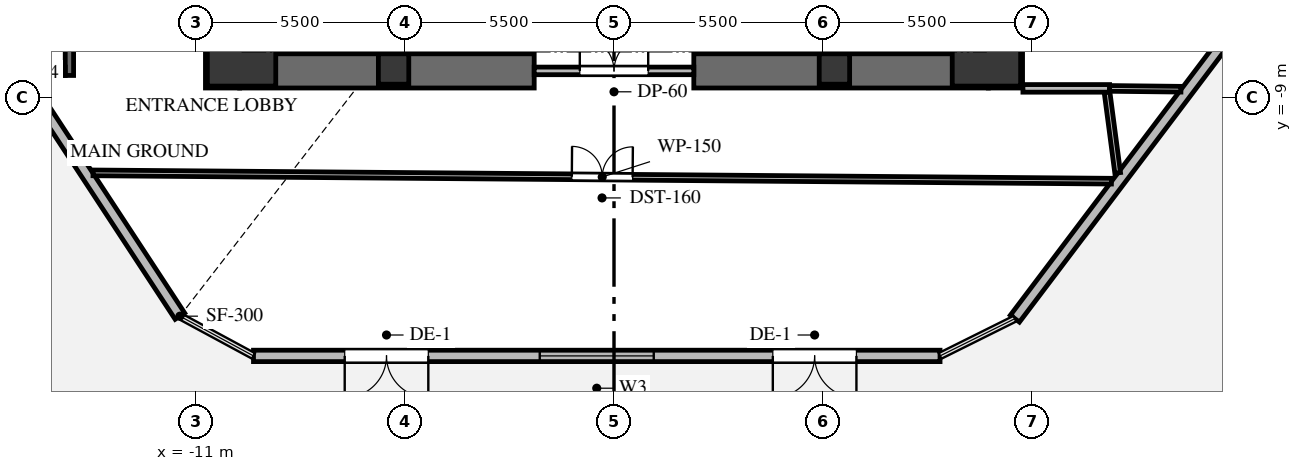
"""IFC4 building model, lengths in metres.
Left out: names, types, materials, properties, quantities, classifications, styles, units other than length and angle.
Written with IfcOpenShell. Run it as: python <this file> out.ifc"""

import sys

from ifc_helpers import new_model, si_unit, direction, frame, frame_2d, origin, origin_2d, place, context, subcontext, project, spatial, rectangle, extrude, source, transform, mapped, element, fill, save


model = new_model("IFC4")
c1 = context("Model", 3, precision=1e-05, world=origin(), true_north=direction((0.0, 1.0)))
c2 = subcontext(c1, "Body", "Model", "MODEL_VIEW")
j1 = project(units=[si_unit("LENGTHUNIT", "METRE"), si_unit("PLANEANGLEUNIT", "RADIAN")], contexts=[c1])
p1 = place(None, origin())
s1 = spatial("IfcSite", under=j1, at=p1, CompositionType="ELEMENT")
p2 = place(p1, origin())
s2 = spatial("IfcBuilding", under=s1, at=p2, CompositionType="ELEMENT")
p3 = place(p2, origin())
s3 = spatial("IfcBuildingStorey", under=s2, at=p3, CompositionType="ELEMENT", Elevation=0.0)
p4 = place(p3, frame((-10.3, -8.75, 0.0), z_axis=(0.0, 0.0, 1.0), x_axis=(0.0, 1.0, 0.0)))
e1 = element("IfcWall", 1, at=p4, inside=s3, PredefinedType="SHEAR", context=c2, shape_type="SweptSolid", body=[
    extrude(rectangle(XDim=17.5, YDim=0.9, at=frame_2d((8.75, 0.0))), origin(), (0.0, 0.0, 1.0), 5.2),
])
p5 = place(p3, frame((10.3, -8.75, 0.0), z_axis=(0.0, 0.0, 1.0), x_axis=(0.0, 1.0, 0.0)))
e2 = element("IfcWall", 2, at=p5, inside=s3, PredefinedType="SHEAR", context=c2, shape_type="SweptSolid", body=[
    extrude(rectangle(XDim=6.65, YDim=0.9, at=frame_2d((3.325, 0.0))), origin(), (0.0, 0.0, 1.0), 5.2),
])
for number, where, z_axis, x_axis in (
    (3, (-9.85, -8.3, 0.0), (0.0, 0.0, 1.0), (1.0, 0.0, 0.0)),
    (4, (2.1, -8.3, 0.0), (0.0, 0.0, 1.0), (1.0, 0.0, 0.0)),
):
    element("IfcWall", number, at=place(p3, frame(where, z_axis=z_axis, x_axis=x_axis)), inside=s3, PredefinedType="SHEAR", context=c2, shape_type="SweptSolid", body=[
        extrude(rectangle(XDim=7.75, YDim=0.9, at=frame_2d((3.875, 0.0))), origin(), (0.0, 0.0, 1.0), 5.2),
    ])
p6 = place(p3, frame((-14.33, -8.42, -0.3), z_axis=(0.0, 0.0, 1.0), x_axis=(0.0, 1.0, 0.0)))
e5 = element("IfcWall", 5, at=p6, inside=s3, PredefinedType="SHEAR", context=c2, shape_type="SweptSolid", body=[
    extrude(rectangle(XDim=7.89, YDim=0.22, at=frame_2d((3.945, 0.0))), origin(), (0.0, 0.0, 1.0), 5.2),
])
p7 = place(p6, frame((6.32, 0.0, 0.0)))
e6 = element("IfcOpeningElement", 6, at=p7, cuts=e5, PredefinedType="OPENING", context=c2, shape_type="SweptSolid", body=[
    extrude(rectangle(XDim=1.05, YDim=2.15, at=frame_2d((0.525, 1.075))), frame((0.0, 0.12, 0.0), z_axis=(0.0, -1.0, 0.0), x_axis=(1.0, 0.0, 0.0)), (0.0, 0.0, 1.0), 0.24),
])
p8 = place(p3, frame((-17.4, -8.31, -0.3), z_axis=(0.0, 0.0, 1.0), x_axis=(1.0, 0.0, 0.0)))
e7 = element("IfcWall", 7, at=p8, inside=s3, PredefinedType="SHEAR", context=c2, shape_type="SweptSolid", body=[
    extrude(rectangle(XDim=2.96, YDim=0.22, at=frame_2d((1.48, 0.0))), origin(), (0.0, 0.0, 1.0), 5.2),
])
m1 = source(origin(), c2, "Body", "SweptSolid", [
    extrude(rectangle(XDim=1.8, YDim=1.8, at=origin_2d()), origin(), (0.0, 0.0, 1.0), 5.2),
])
for number, where, z_axis, x_axis in (
    (8, (-9.8, -7.8, -0.3), (0.0, 0.0, 1.0), (1.0, 0.0, 0.0)),
    (9, (9.8, -7.8, -0.3), (0.0, 0.0, 1.0), (1.0, 0.0, 0.0)),
):
    element("IfcColumn", number, at=place(p3, frame(where, z_axis=z_axis, x_axis=x_axis)), inside=s3, PredefinedType="COLUMN", context=c2, shape_type="MappedRepresentation", body=[
        mapped(m1, transform((0.0, 0.0, 0.0), x_axis=(1.0, 0.0, 0.0), y_axis=(0.0, 1.0, 0.0), z_axis=(0.0, 0.0, 1.0), scale=1.0)),
    ])
m2 = source(origin(), c2, "Body", "SweptSolid", [
    extrude(rectangle(XDim=0.8, YDim=0.8, at=origin_2d()), origin(), (0.0, 0.0, 1.0), 5.2),
])
for number, where, z_axis, x_axis in (
    (10, (-5.8, -8.25, -0.3), (0.0, 0.0, 1.0), (1.0, 0.0, 0.0)),
    (11, (5.8, -8.25, -0.3), (0.0, 0.0, 1.0), (1.0, 0.0, 0.0)),
):
    element("IfcColumn", number, at=place(p3, frame(where, z_axis=z_axis, x_axis=x_axis)), inside=s3, PredefinedType="PILASTER", context=c2, shape_type="MappedRepresentation", body=[
        mapped(m2, transform((0.0, 0.0, 0.0), x_axis=(1.0, 0.0, 0.0), y_axis=(0.0, 1.0, 0.0), z_axis=(0.0, 0.0, 1.0), scale=1.0)),
    ])
p9 = place(p3, frame((20.589, -1.538, 0.0), z_axis=(0.0, 0.0, 1.0), x_axis=(-0.603015201292, -0.797729695455, 0.0)))
e12 = element("IfcWall", 12, at=p9, inside=s3, PredefinedType="SOLIDWALL", context=c2, shape_type="SweptSolid", body=[
    extrude(rectangle(XDim=16.65, YDim=0.3, at=frame_2d((8.325, 0.0))), origin(), (0.0, 0.0, 1.0), 4.9),
])
p10 = place(p9, frame((4.2, 0.0, 0.0)))
e13 = element("IfcOpeningElement", 13, at=p10, cuts=e12, PredefinedType="OPENING", context=c2, shape_type="SweptSolid", body=[
    extrude(rectangle(XDim=2.0, YDim=2.3, at=frame_2d((1.0, 1.15))), frame((0.0, 0.16, 0.0), z_axis=(0.0, -1.0, 0.0), x_axis=(1.0, 0.0, 0.0)), (0.0, 0.0, 1.0), 0.32),
])
p11 = place(p3, frame((8.579, -15.8, 0.0), z_axis=(0.0, 0.0, 1.0), x_axis=(-1.0, 0.0, 0.0)))
e14 = element("IfcWall", 14, at=p11, inside=s3, PredefinedType="SOLIDWALL", context=c2, shape_type="SweptSolid", body=[
    extrude(rectangle(XDim=18.065, YDim=0.3, at=frame_2d((9.033, 0.0))), origin(), (0.0, 0.0, 1.0), 4.9),
])
p12 = place(p11, frame((2.2, 0.0, 0.0)))
e15 = element("IfcOpeningElement", 15, at=p12, cuts=e14, PredefinedType="OPENING", context=c2, shape_type="SweptSolid", body=[
    extrude(rectangle(XDim=2.2, YDim=2.6, at=frame_2d((1.1, 1.3))), frame((0.0, 0.16, 0.0), z_axis=(0.0, -1.0, 0.0), x_axis=(1.0, 0.0, 0.0)), (0.0, 0.0, 1.0), 0.32),
])
p13 = place(p11, frame((13.465, 0.0, 0.0)))
e16 = element("IfcOpeningElement", 16, at=p13, cuts=e14, PredefinedType="OPENING", context=c2, shape_type="SweptSolid", body=[
    extrude(rectangle(XDim=2.2, YDim=2.6, at=frame_2d((1.1, 1.3))), frame((0.0, 0.16, 0.0), z_axis=(0.0, -1.0, 0.0), x_axis=(1.0, 0.0, 0.0)), (0.0, 0.0, 1.0), 0.32),
])
p14 = place(p11, frame((7.533, 0.0, 0.9)))
e17 = element("IfcOpeningElement", 17, at=p14, cuts=e14, PredefinedType="OPENING", context=c2, shape_type="SweptSolid", body=[
    extrude(rectangle(XDim=3.0, YDim=2.4, at=frame_2d((1.5, 1.2))), frame((0.0, 0.16, 0.0), z_axis=(0.0, -1.0, 0.0), x_axis=(1.0, 0.0, 0.0)), (0.0, 0.0, 1.0), 0.32),
])
p15 = place(p3, frame((-11.422, -14.754, 0.0), z_axis=(0.0, 0.0, 1.0), x_axis=(-0.548298501614, 0.836282699288, 0.0)))
e18 = element("IfcWall", 18, at=p15, inside=s3, PredefinedType="SOLIDWALL", context=c2, shape_type="SweptSolid", body=[
    extrude(rectangle(XDim=16.853, YDim=0.3, at=frame_2d((8.426, 0.0))), origin(), (0.0, 0.0, 1.0), 4.9),
])
p16 = place(p15, frame((13.753, 0.0, 0.0)))
e19 = element("IfcOpeningElement", 19, at=p16, cuts=e18, PredefinedType="OPENING", context=c2, shape_type="SweptSolid", body=[
    extrude(rectangle(XDim=2.0, YDim=2.3, at=frame_2d((1.0, 1.15))), frame((0.0, 0.16, 0.0), z_axis=(0.0, -1.0, 0.0), x_axis=(1.0, 0.0, 0.0)), (0.0, 0.0, 1.0), 0.32),
])
p17 = place(p3, frame((-2.1, -8.3, 0.0), z_axis=(0.0, 0.0, 1.0), x_axis=(1.0, 0.0, 0.0)))
e20 = element("IfcWall", 20, at=p17, inside=s3, PredefinedType="SOLIDWALL", context=c2, shape_type="SweptSolid", body=[
    extrude(rectangle(XDim=4.2, YDim=0.2, at=frame_2d((2.1, 0.0))), origin(), (0.0, 0.0, 1.0), 4.885),
])
p18 = place(p17, frame((1.2, 0.0, 0.0)))
e21 = element("IfcOpeningElement", 21, at=p18, cuts=e20, PredefinedType="OPENING", context=c2, shape_type="SweptSolid", body=[
    extrude(rectangle(XDim=1.8, YDim=2.15, at=frame_2d((0.9, 1.075))), frame((0.0, 0.11, 0.0), z_axis=(0.0, -1.0, 0.0), x_axis=(1.0, 0.0, 0.0)), (0.0, 0.0, 1.0), 0.22),
])
p19 = place(p3, frame((10.76, -8.76, 0.0), z_axis=(0.0, 0.0, 1.0), x_axis=(1.0, 0.0, 0.0)))
e22 = element("IfcWall", 22, at=p19, inside=s3, PredefinedType="SOLIDWALL", context=c2, shape_type="SweptSolid", body=[
    extrude(rectangle(XDim=2.28, YDim=0.2, at=frame_2d((1.14, 0.0))), origin(), (0.0, 0.0, 1.0), 4.885),
])
p20 = place(p3, frame((-13.709, -10.983, 0.0), z_axis=(0.0, 0.0, 1.0), x_axis=(0.999966759568, -0.008153512047, 0.0)))
e23 = element("IfcWall", 23, at=p20, inside=s3, PredefinedType="PARTITIONING", context=c2, shape_type="SweptSolid", body=[
    extrude(rectangle(XDim=26.799, YDim=0.15, at=frame_2d((13.399, 0.0))), origin(), (0.0, 0.0, 1.0), 3.807),
])
p21 = place(p20, frame((12.599, 0.0, 0.0)))
e24 = element("IfcOpeningElement", 24, at=p21, cuts=e23, PredefinedType="OPENING", context=c2, shape_type="SweptSolid", body=[
    extrude(rectangle(XDim=1.6, YDim=2.15, at=frame_2d((0.8, 1.075))), frame((0.0, 0.085, 0.0), z_axis=(0.0, -1.0, 0.0), x_axis=(1.0, 0.0, 0.0)), (0.0, 0.0, 1.0), 0.17),
])
p22 = place(p3, frame((13.253, -10.985, 0.0), z_axis=(0.0, 0.0, 1.0), x_axis=(-0.130802903256, 0.991408392389, 0.0)))
e25 = element("IfcWall", 25, at=p22, inside=s3, PredefinedType="PARTITIONING", context=c2, shape_type="SweptSolid", body=[
    extrude(rectangle(XDim=2.139, YDim=0.15, at=frame_2d((1.069, 0.0))), origin(), (0.0, 0.0, 1.0), 4.885),
])
p23 = place(p3, frame((13.04, -8.761, 0.0), z_axis=(0.0, 0.0, 1.0), x_axis=(0.999937520904, -0.011178295437, 0.0)))
e26 = element("IfcWall", 26, at=p23, inside=s3, PredefinedType="PARTITIONING", context=c2, shape_type="SweptSolid", body=[
    extrude(rectangle(XDim=1.878, YDim=0.15, at=frame_2d((0.939, 0.0))), origin(), (0.0, 0.0, 1.0), 4.885),
])
m3 = source(origin(), c2, "Body", "SweptSolid", [
    extrude(rectangle(XDim=2.2, YDim=2.6, at=frame_2d((1.1, 1.3))), frame((0.0, 0.025, 0.0), z_axis=(0.0, -1.0, 0.0), x_axis=(1.0, 0.0, 0.0)), (0.0, 0.0, 1.0), 0.05),
])
p24 = place(p12, origin())
e27 = element("IfcDoor", 27, at=p24, inside=s3, OperationType="DOUBLE_DOOR_SINGLE_SWING", PredefinedType="DOOR", context=c2, shape_type="MappedRepresentation", body=[
    mapped(m3, transform((0.0, 0.0, 0.0), x_axis=(1.0, 0.0, 0.0), y_axis=(0.0, 1.0, 0.0), z_axis=(0.0, 0.0, 1.0), scale=1.0)),
])
fill(e15, e27)
p25 = place(p13, origin())
e28 = element("IfcDoor", 28, at=p25, inside=s3, OperationType="DOUBLE_DOOR_SINGLE_SWING", PredefinedType="DOOR", context=c2, shape_type="MappedRepresentation", body=[
    mapped(m3, transform((0.0, 0.0, 0.0), x_axis=(1.0, 0.0, 0.0), y_axis=(0.0, 1.0, 0.0), z_axis=(0.0, 0.0, 1.0), scale=1.0)),
])
fill(e16, e28)
m4 = source(origin(), c2, "Body", "SweptSolid", [
    extrude(rectangle(XDim=3.0, YDim=2.4, at=frame_2d((1.5, 1.2))), frame((0.0, 0.03, 0.0), z_axis=(0.0, -1.0, 0.0), x_axis=(1.0, 0.0, 0.0)), (0.0, 0.0, 1.0), 0.06),
])
p26 = place(p14, origin())
e29 = element("IfcWindow", 29, at=p26, inside=s3, PartitioningType="TRIPLE_PANEL_VERTICAL", PredefinedType="WINDOW", context=c2, shape_type="MappedRepresentation", body=[
    mapped(m4, transform((0.0, 0.0, 0.0), x_axis=(1.0, 0.0, 0.0), y_axis=(0.0, 1.0, 0.0), z_axis=(0.0, 0.0, 1.0), scale=1.0)),
])
fill(e17, e29)
m5 = source(origin(), c2, "Body", "SweptSolid", [
    extrude(rectangle(XDim=1.8, YDim=2.15, at=frame_2d((0.9, 1.075))), frame((0.0, 0.025, 0.0), z_axis=(0.0, -1.0, 0.0), x_axis=(1.0, 0.0, 0.0)), (0.0, 0.0, 1.0), 0.05),
])
p27 = place(p18, origin())
e30 = element("IfcDoor", 30, at=p27, inside=s3, OperationType="DOUBLE_DOOR_SINGLE_SWING", PredefinedType="DOOR", context=c2, shape_type="MappedRepresentation", body=[
    mapped(m5, transform((0.0, 0.0, 0.0), x_axis=(1.0, 0.0, 0.0), y_axis=(0.0, 1.0, 0.0), z_axis=(0.0, 0.0, 1.0), scale=1.0)),
])
fill(e21, e30)
m6 = source(origin(), c2, "Body", "SweptSolid", [
    extrude(rectangle(XDim=1.6, YDim=2.15, at=frame_2d((0.8, 1.075))), frame((0.0, 0.025, 0.0), z_axis=(0.0, -1.0, 0.0), x_axis=(1.0, 0.0, 0.0)), (0.0, 0.0, 1.0), 0.05),
])
p28 = place(p21, origin())
e31 = element("IfcDoor", 31, at=p28, inside=s3, OperationType="DOUBLE_DOOR_SINGLE_SWING", PredefinedType="DOOR", context=c2, shape_type="MappedRepresentation", body=[
    mapped(m6, transform((0.0, 0.0, 0.0), x_axis=(1.0, 0.0, 0.0), y_axis=(0.0, 1.0, 0.0), z_axis=(0.0, 0.0, 1.0), scale=1.0)),
])
fill(e24, e31)
save(model, sys.argv[1])
